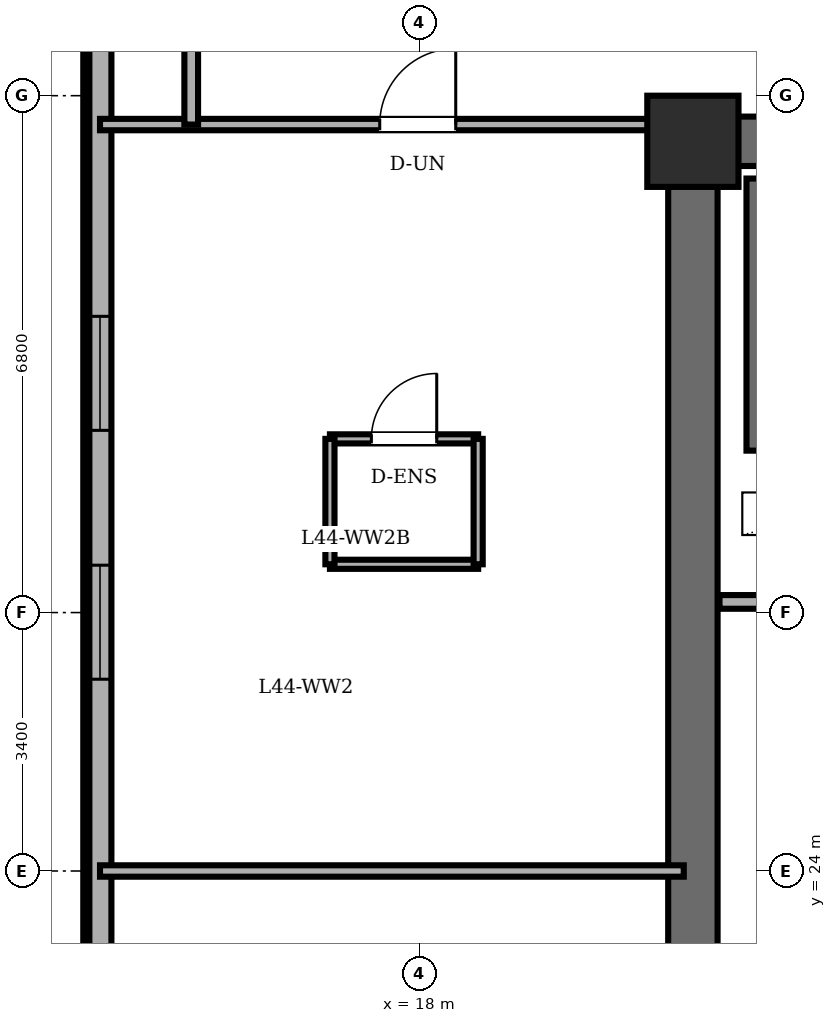
"""IFC4 building model, lengths in metres.
Left out: names, types, materials, properties, quantities, classifications, styles, units other than length and angle.
Written with IfcOpenShell. Run it as: python <this file> out.ifc"""

import sys

from ifc_helpers import new_model, si_unit, direction, frame, frame_2d, origin, origin_2d, place, context, subcontext, project, spatial, rectangle, extrude, element, fill, save


model = new_model("IFC4")
c1 = context("Model", 3, precision=1e-05, world=origin(), true_north=direction((0.0, 1.0)))
c2 = subcontext(c1, "Body", "Model", "MODEL_VIEW")
j1 = project(units=[si_unit("LENGTHUNIT", "METRE"), si_unit("PLANEANGLEUNIT", "RADIAN")], contexts=[c1])
p1 = place(None, origin())
s1 = spatial("IfcSite", under=j1, at=p1, CompositionType="ELEMENT")
p2 = place(p1, origin())
s2 = spatial("IfcBuilding", under=s1, at=p2, CompositionType="ELEMENT")
p3 = place(p2, frame((0.0, 0.0, 169.0)))
s3 = spatial("IfcBuildingStorey", under=s2, at=p3, CompositionType="ELEMENT", Elevation=169.0)
p4 = place(p3, frame((21.6, 33.6, 0.0), z_axis=(0.0, 0.0, 1.0), x_axis=(1.0, 0.0, 0.0)))
e1 = element("IfcColumn", 1, at=p4, inside=s3, PredefinedType="COLUMN", context=c2, shape_type="SweptSolid", body=[
    extrude(rectangle(XDim=1.2, YDim=1.2, at=origin_2d()), origin(), (0.0, 0.0, 1.0), 3.6),
])
p5 = place(p3, frame((13.8, 36.3, 0.0), z_axis=(0.0, 0.0, 1.0), x_axis=(0.0, -1.0, 0.0)))
e2 = element("IfcWall", 2, at=p5, inside=s3, PredefinedType="SOLIDWALL", context=c2, shape_type="SweptSolid", body=[
    extrude(rectangle(XDim=24.6, YDim=0.3, at=frame_2d((12.3, 0.0))), origin(), (0.0, 0.0, 1.0), 3.4),
])
p6 = place(p5, frame((5.003, 0.0, 0.85)))
e3 = element("IfcOpeningElement", 3, at=p6, cuts=e2, PredefinedType="OPENING", context=c2, shape_type="SweptSolid", body=[
    extrude(rectangle(XDim=1.5, YDim=1.55, at=frame_2d((0.75, 0.775))), frame((0.0, 0.16, 0.0), z_axis=(0.0, -1.0, 0.0), x_axis=(1.0, 0.0, 0.0)), (0.0, 0.0, 1.0), 0.32),
])
p7 = place(p5, frame((8.277, 0.0, 0.85)))
e4 = element("IfcOpeningElement", 4, at=p7, cuts=e2, PredefinedType="OPENING", context=c2, shape_type="SweptSolid", body=[
    extrude(rectangle(XDim=1.5, YDim=1.55, at=frame_2d((0.75, 0.775))), frame((0.0, 0.16, 0.0), z_axis=(0.0, -1.0, 0.0), x_axis=(1.0, 0.0, 0.0)), (0.0, 0.0, 1.0), 0.32),
])
p8 = place(p5, frame((14.823, 0.0, 0.85)))
e5 = element("IfcOpeningElement", 5, at=p8, cuts=e2, PredefinedType="OPENING", context=c2, shape_type="SweptSolid", body=[
    extrude(rectangle(XDim=1.5, YDim=1.55, at=frame_2d((0.75, 0.775))), frame((0.0, 0.16, 0.0), z_axis=(0.0, -1.0, 0.0), x_axis=(1.0, 0.0, 0.0)), (0.0, 0.0, 1.0), 0.32),
])
p9 = place(p5, frame((18.097, 0.0, 0.85)))
e6 = element("IfcOpeningElement", 6, at=p9, cuts=e2, PredefinedType="OPENING", context=c2, shape_type="SweptSolid", body=[
    extrude(rectangle(XDim=1.5, YDim=1.55, at=frame_2d((0.75, 0.775))), frame((0.0, 0.16, 0.0), z_axis=(0.0, -1.0, 0.0), x_axis=(1.0, 0.0, 0.0)), (0.0, 0.0, 1.0), 0.32),
])
p10 = place(p3, frame((21.6, 14.4, 0.0), z_axis=(0.0, 0.0, 1.0), x_axis=(0.0, 1.0, 0.0)))
e7 = element("IfcWall", 7, at=p10, inside=s3, PredefinedType="SHEAR", context=c2, shape_type="SweptSolid", body=[
    extrude(rectangle(XDim=19.2, YDim=0.65, at=frame_2d((9.6, 0.0))), origin(), (0.0, 0.0, 1.0), 3.4),
])
p11 = place(p3, frame((21.6, 33.6, 0.0), z_axis=(0.0, 0.0, 1.0), x_axis=(1.0, 0.0, 0.0)))
e8 = element("IfcWall", 8, at=p11, inside=s3, PredefinedType="SHEAR", context=c2, shape_type="SweptSolid", body=[
    extrude(rectangle(XDim=15.6, YDim=0.65, at=frame_2d((7.8, 0.0))), origin(), (0.0, 0.0, 1.0), 3.4),
])
p12 = place(p3, frame((22.48, 29.53, 0.0), z_axis=(0.0, 0.0, 1.0), x_axis=(0.0, 1.0, 0.0)))
e9 = element("IfcWall", 9, at=p12, inside=s3, PredefinedType="SOLIDWALL", context=c2, shape_type="SweptSolid", body=[
    extrude(rectangle(XDim=3.58, YDim=0.35, at=frame_2d((1.79, 0.0))), origin(), (0.0, 0.0, 1.0), 3.4),
])
p13 = place(p3, frame((21.95, 27.54, 0.0), z_axis=(0.0, 0.0, 1.0), x_axis=(1.0, 0.0, 0.0)))
e10 = element("IfcWall", 10, at=p13, inside=s3, PredefinedType="PARTITIONING", context=c2, shape_type="SweptSolid", body=[
    extrude(rectangle(XDim=10.56, YDim=0.18, at=frame_2d((5.28, 0.0))), origin(), (0.0, 0.0, 1.0), 3.4),
])
p14 = place(p3, frame((16.825, 29.685, 0.0), z_axis=(0.0, 0.0, 1.0), x_axis=(1.0, 0.0, 0.0)))
e11 = element("IfcWall", 11, at=p14, inside=s3, PredefinedType="PARTITIONING", context=c2, shape_type="SweptSolid", body=[
    extrude(rectangle(XDim=1.95, YDim=0.12, at=frame_2d((0.975, 0.0))), origin(), (0.0, 0.0, 1.0), 3.4),
])
p15 = place(p14, frame((0.545, 0.0, 0.0)))
e12 = element("IfcOpeningElement", 12, at=p15, cuts=e11, PredefinedType="OPENING", context=c2, shape_type="SweptSolid", body=[
    extrude(rectangle(XDim=0.86, YDim=2.1, at=frame_2d((0.43, 1.05))), frame((0.0, 0.07, 0.0), z_axis=(0.0, -1.0, 0.0), x_axis=(1.0, 0.0, 0.0)), (0.0, 0.0, 1.0), 0.14),
])
p16 = place(p3, frame((18.775, 28.035, 0.0), z_axis=(0.0, 0.0, 1.0), x_axis=(-1.0, 0.0, 0.0)))
e13 = element("IfcWall", 13, at=p16, inside=s3, PredefinedType="PARTITIONING", context=c2, shape_type="SweptSolid", body=[
    extrude(rectangle(XDim=1.95, YDim=0.12, at=frame_2d((0.975, 0.0))), origin(), (0.0, 0.0, 1.0), 3.4),
])
for number, where, z_axis, x_axis in (
    (14, (16.825, 29.685, 0.0), (0.0, 0.0, 1.0), (0.0, -1.0, 0.0)),
    (15, (18.775, 28.035, 0.0), (0.0, 0.0, 1.0), (0.0, 1.0, 0.0)),
):
    element("IfcWall", number, at=place(p3, frame(where, z_axis=z_axis, x_axis=x_axis)), inside=s3, PredefinedType="PARTITIONING", context=c2, shape_type="SweptSolid", body=[
        extrude(rectangle(XDim=1.65, YDim=0.12, at=frame_2d((0.825, 0.0))), origin(), (0.0, 0.0, 1.0), 3.4),
    ])
p17 = place(p3, frame((13.8, 24.0, 0.0), z_axis=(0.0, 0.0, 1.0), x_axis=(1.0, 0.0, 0.0)))
e16 = element("IfcWall", 16, at=p17, inside=s3, PredefinedType="PARTITIONING", context=c2, shape_type="SweptSolid", body=[
    extrude(rectangle(XDim=7.68, YDim=0.15, at=frame_2d((3.84, 0.0))), origin(), (0.0, 0.0, 1.0), 3.4),
])
p18 = place(p3, frame((13.8, 33.82, 0.0), z_axis=(0.0, 0.0, 1.0), x_axis=(1.0, 0.0, 0.0)))
e17 = element("IfcWall", 17, at=p18, inside=s3, PredefinedType="PARTITIONING", context=c2, shape_type="SweptSolid", body=[
    extrude(rectangle(XDim=7.68, YDim=0.15, at=frame_2d((3.84, 0.0))), origin(), (0.0, 0.0, 1.0), 3.4),
])
p19 = place(p18, frame((3.68, 0.0, 0.0)))
e18 = element("IfcOpeningElement", 18, at=p19, cuts=e17, PredefinedType="OPENING", context=c2, shape_type="SweptSolid", body=[
    extrude(rectangle(XDim=1.0, YDim=2.15, at=frame_2d((0.5, 1.075))), frame((0.0, 0.085, 0.0), z_axis=(0.0, -1.0, 0.0), x_axis=(1.0, 0.0, 0.0)), (0.0, 0.0, 1.0), 0.17),
])
p20 = place(p3, frame((15.0, 33.82, 0.0), z_axis=(0.0, 0.0, 1.0), x_axis=(0.0, 1.0, 0.0)))
e19 = element("IfcWall", 19, at=p20, inside=s3, PredefinedType="PARTITIONING", context=c2, shape_type="SweptSolid", body=[
    extrude(rectangle(XDim=5.693, YDim=0.18, at=frame_2d((2.846, 0.0))), origin(), (0.0, 0.0, 1.0), 3.4),
])
p21 = place(p6, origin())
e20 = element("IfcWindow", 20, at=p21, inside=s3, PartitioningType="DOUBLE_PANEL_VERTICAL", PredefinedType="WINDOW", context=c2, shape_type="SweptSolid", body=[
    extrude(rectangle(XDim=1.5, YDim=1.55, at=frame_2d((0.75, 0.775))), frame((0.0, 0.03, 0.0), z_axis=(0.0, -1.0, 0.0), x_axis=(1.0, 0.0, 0.0)), (0.0, 0.0, 1.0), 0.06),
])
fill(e3, e20)
p22 = place(p7, origin())
e21 = element("IfcWindow", 21, at=p22, inside=s3, PartitioningType="DOUBLE_PANEL_VERTICAL", PredefinedType="WINDOW", context=c2, shape_type="SweptSolid", body=[
    extrude(rectangle(XDim=1.5, YDim=1.55, at=frame_2d((0.75, 0.775))), frame((0.0, 0.03, 0.0), z_axis=(0.0, -1.0, 0.0), x_axis=(1.0, 0.0, 0.0)), (0.0, 0.0, 1.0), 0.06),
])
fill(e4, e21)
p23 = place(p15, origin())
e22 = element("IfcDoor", 22, at=p23, inside=s3, OperationType="SINGLE_SWING_RIGHT", PredefinedType="DOOR", context=c2, shape_type="SweptSolid", body=[
    extrude(rectangle(XDim=0.86, YDim=2.1, at=frame_2d((0.43, 1.05))), frame((0.0, 0.025, 0.0), z_axis=(0.0, -1.0, 0.0), x_axis=(1.0, 0.0, 0.0)), (0.0, 0.0, 1.0), 0.05),
])
fill(e12, e22)
p24 = place(p19, origin())
e23 = element("IfcDoor", 23, at=p24, inside=s3, OperationType="SINGLE_SWING_RIGHT", PredefinedType="DOOR", context=c2, shape_type="SweptSolid", body=[
    extrude(rectangle(XDim=1.0, YDim=2.15, at=frame_2d((0.5, 1.075))), frame((0.0, 0.025, 0.0), z_axis=(0.0, -1.0, 0.0), x_axis=(1.0, 0.0, 0.0)), (0.0, 0.0, 1.0), 0.05),
])
fill(e18, e23)
save(model, sys.argv[1])
